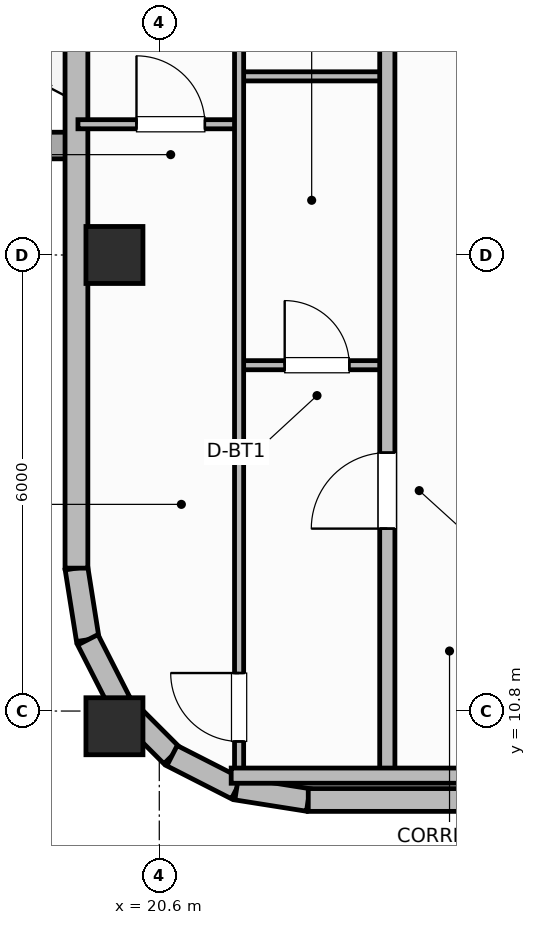
"""IFC4 building model, lengths in metres.
Left out: names, types, materials, properties, quantities, classifications, styles, units other than length and angle.
Written with IfcOpenShell. Run it as: python <this file> out.ifc"""

import sys

from ifc_helpers import new_model, si_unit, direction, frame, frame_2d, origin, origin_2d, place, context, subcontext, project, spatial, rectangle, extrude, element, fill, save


model = new_model("IFC4")
c1 = context("Model", 3, precision=1e-05, world=origin(), true_north=direction((0.0, 1.0)))
c2 = subcontext(c1, "Body", "Model", "MODEL_VIEW")
j1 = project(units=[si_unit("LENGTHUNIT", "METRE"), si_unit("PLANEANGLEUNIT", "RADIAN")], contexts=[c1])
p1 = place(None, origin())
s1 = spatial("IfcSite", under=j1, at=p1, CompositionType="ELEMENT")
p2 = place(p1, origin())
s2 = spatial("IfcBuilding", under=s1, at=p2, CompositionType="ELEMENT")
p3 = place(p2, frame((0.0, 0.0, 293.5)))
s3 = spatial("IfcBuildingStorey", under=s2, at=p3, CompositionType="ELEMENT", Elevation=293.5)
for number, where, z_axis, x_axis in (
    (1, (20.01, 10.6, 0.0), (0.0, 0.0, 1.0), (1.0, 0.0, 0.0)),
    (2, (20.01, 16.8, 0.0), (0.0, 0.0, 1.0), (1.0, 0.0, 0.0)),
):
    element("IfcColumn", number, at=place(p3, frame(where, z_axis=z_axis, x_axis=x_axis)), inside=s3, PredefinedType="COLUMN", context=c2, shape_type="SweptSolid", body=[
        extrude(rectangle(XDim=0.75, YDim=0.75, at=origin_2d()), origin(), (0.0, 0.0, 1.0), 3.7),
    ])
p4 = place(p3, frame((19.51, 12.68, 0.0), z_axis=(0.0, 0.0, 1.0), x_axis=(0.156343617883, -0.987702725088, 0.0)))
e3 = element("IfcWall", 3, at=p4, inside=s3, PredefinedType="SOLIDWALL", context=c2, shape_type="SweptSolid", body=[
    extrude(rectangle(XDim=0.954, YDim=0.3, at=frame_2d((0.477, 0.0))), origin(), (0.0, 0.0, 1.0), 2.71),
])
for number, where, z_axis, x_axis in (
    (4, (19.659, 11.738, 0.0), (0.0, 0.0, 1.0), (0.454, -0.891, 0.0)),
    (5, (20.093, 10.887, 0.0), (0.0, 0.0, 1.0), (0.707, -0.707, 0.0)),
):
    element("IfcWall", number, at=place(p3, frame(where, z_axis=z_axis, x_axis=x_axis)), inside=s3, PredefinedType="SOLIDWALL", context=c2, shape_type="SweptSolid", body=[
        extrude(rectangle(XDim=0.954, YDim=0.3, at=frame_2d((0.477, 0.0))), origin(), (0.0, 0.0, 1.0), 2.71),
    ])
p5 = place(p3, frame((20.767, 10.212, 0.0), z_axis=(0.0, 0.0, 1.0), x_axis=(0.891023873617, -0.45395644796, 0.0)))
e6 = element("IfcWall", 6, at=p5, inside=s3, PredefinedType="SOLIDWALL", context=c2, shape_type="SweptSolid", body=[
    extrude(rectangle(XDim=0.954, YDim=0.3, at=frame_2d((0.477, 0.0))), origin(), (0.0, 0.0, 1.0), 2.71),
])
p6 = place(p3, frame((21.617, 9.779, 0.0), z_axis=(0.0, 0.0, 1.0), x_axis=(0.987669453596, -0.156553666304, 0.0)))
e7 = element("IfcWall", 7, at=p6, inside=s3, PredefinedType="SOLIDWALL", context=c2, shape_type="SweptSolid", body=[
    extrude(rectangle(XDim=0.954, YDim=0.3, at=frame_2d((0.477, 0.0))), origin(), (0.0, 0.0, 1.0), 2.71),
])
p7 = place(p3, frame((22.56, 9.63, 0.0), z_axis=(0.0, 0.0, 1.0), x_axis=(1.0, 0.0, 0.0)))
e8 = element("IfcWall", 8, at=p7, inside=s3, PredefinedType="SOLIDWALL", context=c2, shape_type="SweptSolid", body=[
    extrude(rectangle(XDim=4.45, YDim=0.3, at=frame_2d((2.225, 0.0))), origin(), (0.0, 0.0, 1.0), 2.71),
])
p8 = place(p3, frame((19.51, 23.8, 0.0), z_axis=(0.0, 0.0, 1.0), x_axis=(0.0, -1.0, 0.0)))
e9 = element("IfcWall", 9, at=p8, inside=s3, PredefinedType="SOLIDWALL", context=c2, shape_type="SweptSolid", body=[
    extrude(rectangle(XDim=11.12, YDim=0.3, at=frame_2d((5.56, 0.0))), origin(), (0.0, 0.0, 1.0), 2.71),
])
p9 = place(p8, frame((1.7, 0.0, 0.0)))
e10 = element("IfcOpeningElement", 10, at=p9, cuts=e9, PredefinedType="OPENING", context=c2, shape_type="SweptSolid", body=[
    extrude(rectangle(XDim=1.6, YDim=2.1, at=frame_2d((0.8, 1.05))), frame((0.0, 0.16, 0.0), z_axis=(0.0, -1.0, 0.0), x_axis=(1.0, 0.0, 0.0)), (0.0, 0.0, 1.0), 0.32),
])
p10 = place(p3, frame((21.65, 15.35, 0.0), z_axis=(0.0, 0.0, 1.0), x_axis=(1.0, 0.0, 0.0)))
e11 = element("IfcWall", 11, at=p10, inside=s3, PredefinedType="PARTITIONING", context=c2, shape_type="SweptSolid", body=[
    extrude(rectangle(XDim=1.95, YDim=0.12, at=frame_2d((0.975, 0.0))), origin(), (0.0, 0.0, 1.0), 2.54),
])
p11 = place(p10, frame((0.6, 0.0, 0.0)))
e12 = element("IfcOpeningElement", 12, at=p11, cuts=e11, PredefinedType="OPENING", context=c2, shape_type="SweptSolid", body=[
    extrude(rectangle(XDim=0.85, YDim=2.1, at=frame_2d((0.425, 1.05))), frame((0.0, 0.07, 0.0), z_axis=(0.0, -1.0, 0.0), x_axis=(1.0, 0.0, 0.0)), (0.0, 0.0, 1.0), 0.14),
])
p12 = place(p3, frame((21.65, 19.15, 0.0), z_axis=(0.0, 0.0, 1.0), x_axis=(1.0, 0.0, 0.0)))
e13 = element("IfcWall", 13, at=p12, inside=s3, PredefinedType="PARTITIONING", context=c2, shape_type="SweptSolid", body=[
    extrude(rectangle(XDim=1.95, YDim=0.12, at=frame_2d((0.975, 0.0))), origin(), (0.0, 0.0, 1.0), 2.54),
])
p13 = place(p3, frame((19.53, 18.52, 0.0), z_axis=(0.0, 0.0, 1.0), x_axis=(1.0, 0.0, 0.0)))
e14 = element("IfcWall", 14, at=p13, inside=s3, PredefinedType="PARTITIONING", context=c2, shape_type="SweptSolid", body=[
    extrude(rectangle(XDim=2.12, YDim=0.12, at=frame_2d((1.06, 0.0))), origin(), (0.0, 0.0, 1.0), 2.54),
])
p14 = place(p13, frame((0.77, 0.0, 0.0)))
e15 = element("IfcOpeningElement", 15, at=p14, cuts=e14, PredefinedType="OPENING", context=c2, shape_type="SweptSolid", body=[
    extrude(rectangle(XDim=0.9, YDim=2.1, at=frame_2d((0.45, 1.05))), frame((0.0, 0.07, 0.0), z_axis=(0.0, -1.0, 0.0), x_axis=(1.0, 0.0, 0.0)), (0.0, 0.0, 1.0), 0.14),
])
p15 = place(p3, frame((21.65, 9.99, 0.0), z_axis=(0.0, 0.0, 1.0), x_axis=(0.0, 1.0, 0.0)))
e16 = element("IfcWall", 16, at=p15, inside=s3, PredefinedType="PARTITIONING", context=c2, shape_type="SweptSolid", body=[
    extrude(rectangle(XDim=22.72, YDim=0.12, at=frame_2d((11.36, 0.0))), origin(), (0.0, 0.0, 1.0), 2.54),
])
p16 = place(p15, frame((0.41, 0.0, 0.0)))
e17 = element("IfcOpeningElement", 17, at=p16, cuts=e16, PredefinedType="OPENING", context=c2, shape_type="SweptSolid", body=[
    extrude(rectangle(XDim=0.9, YDim=2.1, at=frame_2d((0.45, 1.05))), frame((0.0, 0.07, 0.0), z_axis=(0.0, -1.0, 0.0), x_axis=(1.0, 0.0, 0.0)), (0.0, 0.0, 1.0), 0.14),
])
p17 = place(p15, frame((15.535, 0.0, 0.0)))
e18 = element("IfcOpeningElement", 18, at=p17, cuts=e16, PredefinedType="OPENING", context=c2, shape_type="SweptSolid", body=[
    extrude(rectangle(XDim=0.82, YDim=2.08, at=frame_2d((0.41, 1.04))), frame((0.0, 0.07, 0.0), z_axis=(0.0, -1.0, 0.0), x_axis=(1.0, 0.0, 0.0)), (0.0, 0.0, 1.0), 0.14),
])
p18 = place(p3, frame((23.6, 9.95, 0.0), z_axis=(0.0, 0.0, 1.0), x_axis=(0.0, 1.0, 0.0)))
e19 = element("IfcWall", 19, at=p18, inside=s3, PredefinedType="PARTITIONING", context=c2, shape_type="SweptSolid", body=[
    extrude(rectangle(XDim=36.5, YDim=0.2, at=frame_2d((18.25, 0.0))), origin(), (0.0, 0.0, 1.0), 2.54),
])
p19 = place(p18, frame((3.25, 0.0, 0.0)))
e20 = element("IfcOpeningElement", 20, at=p19, cuts=e19, PredefinedType="OPENING", context=c2, shape_type="SweptSolid", body=[
    extrude(rectangle(XDim=1.0, YDim=2.15, at=frame_2d((0.5, 1.075))), frame((0.0, 0.11, 0.0), z_axis=(0.0, -1.0, 0.0), x_axis=(1.0, 0.0, 0.0)), (0.0, 0.0, 1.0), 0.22),
])
p20 = place(p18, frame((23.5, 0.0, 0.0)))
e21 = element("IfcOpeningElement", 21, at=p20, cuts=e19, PredefinedType="OPENING", context=c2, shape_type="SweptSolid", body=[
    extrude(rectangle(XDim=1.0, YDim=2.15, at=frame_2d((0.5, 1.075))), frame((0.0, 0.11, 0.0), z_axis=(0.0, -1.0, 0.0), x_axis=(1.0, 0.0, 0.0)), (0.0, 0.0, 1.0), 0.22),
])
p21 = place(p3, frame((21.546, 9.95, 0.0), z_axis=(0.0, 0.0, 1.0), x_axis=(1.0, 0.0, 0.0)))
e22 = element("IfcWall", 22, at=p21, inside=s3, PredefinedType="PARTITIONING", context=c2, shape_type="SweptSolid", body=[
    extrude(rectangle(XDim=3.754, YDim=0.2, at=frame_2d((1.877, 0.0))), origin(), (0.0, 0.0, 1.0), 2.54),
])
p22 = place(p11, origin())
e23 = element("IfcDoor", 23, at=p22, inside=s3, OperationType="SINGLE_SWING_LEFT", PredefinedType="DOOR", context=c2, shape_type="SweptSolid", body=[
    extrude(rectangle(XDim=0.85, YDim=2.1, at=frame_2d((0.425, 1.05))), frame((0.0, 0.025, 0.0), z_axis=(0.0, -1.0, 0.0), x_axis=(1.0, 0.0, 0.0)), (0.0, 0.0, 1.0), 0.05),
])
fill(e12, e23)
p23 = place(p14, origin())
e24 = element("IfcDoor", 24, at=p23, inside=s3, OperationType="SINGLE_SWING_LEFT", PredefinedType="DOOR", context=c2, shape_type="SweptSolid", body=[
    extrude(rectangle(XDim=0.9, YDim=2.1, at=frame_2d((0.45, 1.05))), frame((0.0, 0.025, 0.0), z_axis=(0.0, -1.0, 0.0), x_axis=(1.0, 0.0, 0.0)), (0.0, 0.0, 1.0), 0.05),
])
fill(e15, e24)
p24 = place(p16, origin())
e25 = element("IfcDoor", 25, at=p24, inside=s3, OperationType="SINGLE_SWING_RIGHT", PredefinedType="DOOR", context=c2, shape_type="SweptSolid", body=[
    extrude(rectangle(XDim=0.9, YDim=2.1, at=frame_2d((0.45, 1.05))), frame((0.0, 0.025, 0.0), z_axis=(0.0, -1.0, 0.0), x_axis=(1.0, 0.0, 0.0)), (0.0, 0.0, 1.0), 0.05),
])
fill(e17, e25)
p25 = place(p19, origin())
e26 = element("IfcDoor", 26, at=p25, inside=s3, OperationType="SINGLE_SWING_LEFT", PredefinedType="DOOR", context=c2, shape_type="SweptSolid", body=[
    extrude(rectangle(XDim=1.0, YDim=2.15, at=frame_2d((0.5, 1.075))), frame((0.0, 0.025, 0.0), z_axis=(0.0, -1.0, 0.0), x_axis=(1.0, 0.0, 0.0)), (0.0, 0.0, 1.0), 0.05),
])
fill(e20, e26)
save(model, sys.argv[1])
